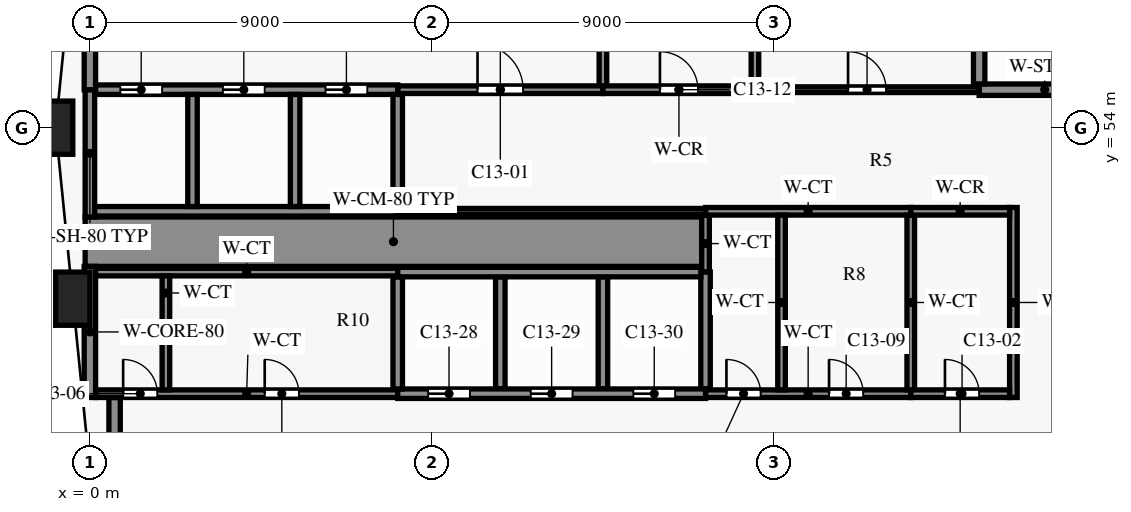
"""IFC4 building model, lengths in metres.
Left out: names, types, materials, properties, quantities, classifications, styles, units other than length and angle.
Written with IfcOpenShell. Run it as: python <this file> out.ifc"""

import sys

from ifc_helpers import new_model, si_unit, direction, frame, frame_2d, origin, origin_2d, place, context, subcontext, project, spatial, rectangle, extrude, element, fill, save


model = new_model("IFC4")
c1 = context("Model", 3, precision=1e-05, world=origin(), true_north=direction((0.0, 1.0)))
c2 = subcontext(c1, "Body", "Model", "MODEL_VIEW")
j1 = project(units=[si_unit("LENGTHUNIT", "METRE"), si_unit("PLANEANGLEUNIT", "RADIAN")], contexts=[c1])
p1 = place(None, origin())
s1 = spatial("IfcSite", under=j1, at=p1, CompositionType="ELEMENT")
p2 = place(p1, origin())
s2 = spatial("IfcBuilding", under=s1, at=p2, CompositionType="ELEMENT")
p3 = place(p2, frame((0.0, 0.0, 84.3)))
s3 = spatial("IfcBuildingStorey", under=s2, at=p3, CompositionType="ELEMENT", Elevation=84.3)
for number, where, z_axis, x_axis in (
    (1, (-0.9, 54.0, 0.0), (0.0, 0.0, 1.0), (0.0, -1.0, 0.0)),
    (2, (-0.45, 49.5, 0.0), (0.0, 0.0, 1.0), (0.1, -0.995, 0.0)),
):
    element("IfcColumn", number, at=place(p3, frame(where, z_axis=z_axis, x_axis=x_axis)), inside=s3, PredefinedType="COLUMN", context=c2, shape_type="SweptSolid", body=[
        extrude(rectangle(XDim=0.9, YDim=1.4, at=origin_2d()), origin(), (0.0, 0.0, 1.0), 4.2),
    ])
p4 = place(p3, frame((0.15, 47.0, 0.0), z_axis=(0.0, 0.0, 1.0), x_axis=(1.0, 0.0, 0.0)))
e3 = element("IfcWall", 3, at=p4, inside=s3, PredefinedType="PARTITIONING", context=c2, shape_type="SweptSolid", body=[
    extrude(rectangle(XDim=7.95, YDim=0.2, at=frame_2d((3.975, 0.0))), origin(), (0.0, 0.0, 1.0), 3.9),
])
p5 = place(p4, frame((0.725, 0.0, 0.0)))
e4 = element("IfcOpeningElement", 4, at=p5, cuts=e3, PredefinedType="OPENING", context=c2, shape_type="SweptSolid", body=[
    extrude(rectangle(XDim=0.9, YDim=2.1, at=frame_2d((0.45, 1.05))), frame((0.0, 0.11, 0.0), z_axis=(0.0, -1.0, 0.0), x_axis=(1.0, 0.0, 0.0)), (0.0, 0.0, 1.0), 0.22),
])
p6 = place(p4, frame((4.45, 0.0, 0.0)))
e5 = element("IfcOpeningElement", 5, at=p6, cuts=e3, PredefinedType="OPENING", context=c2, shape_type="SweptSolid", body=[
    extrude(rectangle(XDim=0.9, YDim=2.1, at=frame_2d((0.45, 1.05))), frame((0.0, 0.11, 0.0), z_axis=(0.0, -1.0, 0.0), x_axis=(1.0, 0.0, 0.0)), (0.0, 0.0, 1.0), 0.22),
])
p7 = place(p3, frame((16.2, 47.0, 0.0), z_axis=(0.0, 0.0, 1.0), x_axis=(1.0, 0.0, 0.0)))
e6 = element("IfcWall", 6, at=p7, inside=s3, PredefinedType="PARTITIONING", context=c2, shape_type="SweptSolid", body=[
    extrude(rectangle(XDim=5.4, YDim=0.2, at=frame_2d((2.7, 0.0))), origin(), (0.0, 0.0, 1.0), 3.9),
])
p8 = place(p7, frame((0.55, 0.0, 0.0)))
e7 = element("IfcOpeningElement", 7, at=p8, cuts=e6, PredefinedType="OPENING", context=c2, shape_type="SweptSolid", body=[
    extrude(rectangle(XDim=0.9, YDim=2.1, at=frame_2d((0.45, 1.05))), frame((0.0, 0.11, 0.0), z_axis=(0.0, -1.0, 0.0), x_axis=(1.0, 0.0, 0.0)), (0.0, 0.0, 1.0), 0.22),
])
p9 = place(p7, frame((3.25, 0.0, 0.0)))
e8 = element("IfcOpeningElement", 8, at=p9, cuts=e6, PredefinedType="OPENING", context=c2, shape_type="SweptSolid", body=[
    extrude(rectangle(XDim=0.9, YDim=2.1, at=frame_2d((0.45, 1.05))), frame((0.0, 0.11, 0.0), z_axis=(0.0, -1.0, 0.0), x_axis=(1.0, 0.0, 0.0)), (0.0, 0.0, 1.0), 0.22),
])
p10 = place(p3, frame((21.6, 47.0, 0.0), z_axis=(0.0, 0.0, 1.0), x_axis=(1.0, 0.0, 0.0)))
e9 = element("IfcWall", 9, at=p10, inside=s3, PredefinedType="PARTITIONING", context=c2, shape_type="SweptSolid", body=[
    extrude(rectangle(XDim=2.6, YDim=0.2, at=frame_2d((1.3, 0.0))), origin(), (0.0, 0.0, 1.0), 3.9),
])
p11 = place(p10, frame((0.9, 0.0, 0.0)))
e10 = element("IfcOpeningElement", 10, at=p11, cuts=e9, PredefinedType="OPENING", context=c2, shape_type="SweptSolid", body=[
    extrude(rectangle(XDim=0.9, YDim=2.1, at=frame_2d((0.45, 1.05))), frame((0.0, 0.11, 0.0), z_axis=(0.0, -1.0, 0.0), x_axis=(1.0, 0.0, 0.0)), (0.0, 0.0, 1.0), 0.22),
])
p12 = place(p3, frame((8.1, 47.0, 0.0), z_axis=(0.0, 0.0, 1.0), x_axis=(1.0, 0.0, 0.0)))
e11 = element("IfcWall", 11, at=p12, inside=s3, PredefinedType="SHEAR", context=c2, shape_type="SweptSolid", body=[
    extrude(rectangle(XDim=8.1, YDim=0.25, at=frame_2d((4.05, 0.0))), origin(), (0.0, 0.0, 1.0), 3.9),
])
p13 = place(p12, frame((0.8, 0.0, 0.0)))
e12 = element("IfcOpeningElement", 12, at=p13, cuts=e11, PredefinedType="OPENING", context=c2, shape_type="SweptSolid", body=[
    extrude(rectangle(XDim=1.1, YDim=2.1, at=frame_2d((0.55, 1.05))), frame((0.0, 0.135, 0.0), z_axis=(0.0, -1.0, 0.0), x_axis=(1.0, 0.0, 0.0)), (0.0, 0.0, 1.0), 0.27),
])
p14 = place(p12, frame((3.5, 0.0, 0.0)))
e13 = element("IfcOpeningElement", 13, at=p14, cuts=e11, PredefinedType="OPENING", context=c2, shape_type="SweptSolid", body=[
    extrude(rectangle(XDim=1.1, YDim=2.1, at=frame_2d((0.55, 1.05))), frame((0.0, 0.135, 0.0), z_axis=(0.0, -1.0, 0.0), x_axis=(1.0, 0.0, 0.0)), (0.0, 0.0, 1.0), 0.27),
])
p15 = place(p12, frame((6.2, 0.0, 0.0)))
e14 = element("IfcOpeningElement", 14, at=p15, cuts=e11, PredefinedType="OPENING", context=c2, shape_type="SweptSolid", body=[
    extrude(rectangle(XDim=1.1, YDim=2.1, at=frame_2d((0.55, 1.05))), frame((0.0, 0.135, 0.0), z_axis=(0.0, -1.0, 0.0), x_axis=(1.0, 0.0, 0.0)), (0.0, 0.0, 1.0), 0.27),
])
p16 = place(p3, frame((0.15, 50.2, 0.0), z_axis=(0.0, 0.0, 1.0), x_axis=(1.0, 0.0, 0.0)))
e15 = element("IfcWall", 15, at=p16, inside=s3, PredefinedType="PARTITIONING", context=c2, shape_type="SweptSolid", body=[
    extrude(rectangle(XDim=7.95, YDim=0.2, at=frame_2d((3.975, 0.0))), origin(), (0.0, 0.0, 1.0), 3.9),
])
p17 = place(p3, frame((8.1, 50.2, 0.0), z_axis=(0.0, 0.0, 1.0), x_axis=(1.0, 0.0, 0.0)))
e16 = element("IfcWall", 16, at=p17, inside=s3, PredefinedType="SHEAR", context=c2, shape_type="SweptSolid", body=[
    extrude(rectangle(XDim=7.975, YDim=0.25, at=frame_2d((3.987, 0.0))), origin(), (0.0, 0.0, 1.0), 3.9),
])
p18 = place(p3, frame((-0.125, 51.0, 0.0), z_axis=(0.0, 0.0, 1.0), x_axis=(1.0, 0.0, 0.0)))
e17 = element("IfcWall", 17, at=p18, inside=s3, PredefinedType="SHEAR", context=c2, shape_type="SweptSolid", body=[
    extrude(rectangle(XDim=16.225, YDim=1.3, at=frame_2d((8.113, 0.0))), origin(), (0.0, 0.0, 1.0), 3.9),
])
p19 = place(p3, frame((8.1, 51.8, 0.0), z_axis=(0.0, 0.0, 1.0), x_axis=(1.0, 0.0, 0.0)))
e18 = element("IfcWall", 18, at=p19, inside=s3, PredefinedType="PARTITIONING", context=c2, shape_type="SweptSolid", body=[
    extrude(rectangle(XDim=8.1, YDim=0.15, at=frame_2d((4.05, 0.0))), origin(), (0.0, 0.0, 1.0), 3.9),
])
p20 = place(p3, frame((16.2, 51.8, 0.0), z_axis=(0.0, 0.0, 1.0), x_axis=(1.0, 0.0, 0.0)))
e19 = element("IfcWall", 19, at=p20, inside=s3, PredefinedType="PARTITIONING", context=c2, shape_type="SweptSolid", body=[
    extrude(rectangle(XDim=5.4, YDim=0.2, at=frame_2d((2.7, 0.0))), origin(), (0.0, 0.0, 1.0), 3.9),
])
p21 = place(p3, frame((21.6, 51.8, 0.0), z_axis=(0.0, 0.0, 1.0), x_axis=(1.0, 0.0, 0.0)))
e20 = element("IfcWall", 20, at=p21, inside=s3, PredefinedType="PARTITIONING", context=c2, shape_type="SweptSolid", body=[
    extrude(rectangle(XDim=2.6, YDim=0.2, at=frame_2d((1.3, 0.0))), origin(), (0.0, 0.0, 1.0), 3.9),
])
p22 = place(p3, frame((0.125, 51.8, 0.0), z_axis=(0.0, 0.0, 1.0), x_axis=(1.0, 0.0, 0.0)))
e21 = element("IfcWall", 21, at=p22, inside=s3, PredefinedType="SHEAR", context=c2, shape_type="SweptSolid", body=[
    extrude(rectangle(XDim=7.975, YDim=0.25, at=frame_2d((3.988, 0.0))), origin(), (0.0, 0.0, 1.0), 3.9),
])
p23 = place(p3, frame((8.1, 55.0, 0.0), z_axis=(0.0, 0.0, 1.0), x_axis=(1.0, 0.0, 0.0)))
e22 = element("IfcWall", 22, at=p23, inside=s3, PredefinedType="PARTITIONING", context=c2, shape_type="SweptSolid", body=[
    extrude(rectangle(XDim=5.4, YDim=0.2, at=frame_2d((2.7, 0.0))), origin(), (0.0, 0.0, 1.0), 3.9),
])
p24 = place(p23, frame((2.1, 0.0, 0.0)))
e23 = element("IfcOpeningElement", 23, at=p24, cuts=e22, PredefinedType="OPENING", context=c2, shape_type="SweptSolid", body=[
    extrude(rectangle(XDim=1.2, YDim=2.2, at=frame_2d((0.6, 1.1))), frame((0.0, 0.11, 0.0), z_axis=(0.0, -1.0, 0.0), x_axis=(1.0, 0.0, 0.0)), (0.0, 0.0, 1.0), 0.22),
])
p25 = place(p3, frame((17.5, 55.0, 0.0), z_axis=(0.0, 0.0, 1.0), x_axis=(1.0, 0.0, 0.0)))
e24 = element("IfcWall", 24, at=p25, inside=s3, PredefinedType="PARTITIONING", context=c2, shape_type="SweptSolid", body=[
    extrude(rectangle(XDim=5.9, YDim=0.15, at=frame_2d((2.95, 0.0))), origin(), (0.0, 0.0, 1.0), 3.9),
])
p26 = place(p25, frame((2.45, 0.0, 0.0)))
e25 = element("IfcOpeningElement", 25, at=p26, cuts=e24, PredefinedType="OPENING", context=c2, shape_type="SweptSolid", body=[
    extrude(rectangle(XDim=1.0, YDim=2.1, at=frame_2d((0.5, 1.05))), frame((0.0, 0.085, 0.0), z_axis=(0.0, -1.0, 0.0), x_axis=(1.0, 0.0, 0.0)), (0.0, 0.0, 1.0), 0.17),
])
p27 = place(p3, frame((13.5, 55.0, 0.0), z_axis=(0.0, 0.0, 1.0), x_axis=(1.0, 0.0, 0.0)))
e26 = element("IfcWall", 26, at=p27, inside=s3, PredefinedType="PARTITIONING", context=c2, shape_type="SweptSolid", body=[
    extrude(rectangle(XDim=4.0, YDim=0.2, at=frame_2d((2.0, 0.0))), origin(), (0.0, 0.0, 1.0), 3.9),
])
p28 = place(p27, frame((1.5, 0.0, 0.0)))
e27 = element("IfcOpeningElement", 27, at=p28, cuts=e26, PredefinedType="OPENING", context=c2, shape_type="SweptSolid", body=[
    extrude(rectangle(XDim=1.0, YDim=2.1, at=frame_2d((0.5, 1.05))), frame((0.0, 0.11, 0.0), z_axis=(0.0, -1.0, 0.0), x_axis=(1.0, 0.0, 0.0)), (0.0, 0.0, 1.0), 0.22),
])
p29 = place(p3, frame((0.15, 55.0, 0.0), z_axis=(0.0, 0.0, 1.0), x_axis=(1.0, 0.0, 0.0)))
e28 = element("IfcWall", 28, at=p29, inside=s3, PredefinedType="SHEAR", context=c2, shape_type="SweptSolid", body=[
    extrude(rectangle(XDim=7.95, YDim=0.25, at=frame_2d((3.975, 0.0))), origin(), (0.0, 0.0, 1.0), 3.9),
])
p30 = place(p29, frame((0.65, 0.0, 0.0)))
e29 = element("IfcOpeningElement", 29, at=p30, cuts=e28, PredefinedType="OPENING", context=c2, shape_type="SweptSolid", body=[
    extrude(rectangle(XDim=1.1, YDim=2.1, at=frame_2d((0.55, 1.05))), frame((0.0, 0.135, 0.0), z_axis=(0.0, -1.0, 0.0), x_axis=(1.0, 0.0, 0.0)), (0.0, 0.0, 1.0), 0.27),
])
p31 = place(p29, frame((3.35, 0.0, 0.0)))
e30 = element("IfcOpeningElement", 30, at=p31, cuts=e28, PredefinedType="OPENING", context=c2, shape_type="SweptSolid", body=[
    extrude(rectangle(XDim=1.1, YDim=2.1, at=frame_2d((0.55, 1.05))), frame((0.0, 0.135, 0.0), z_axis=(0.0, -1.0, 0.0), x_axis=(1.0, 0.0, 0.0)), (0.0, 0.0, 1.0), 0.27),
])
p32 = place(p29, frame((6.05, 0.0, 0.0)))
e31 = element("IfcOpeningElement", 31, at=p32, cuts=e28, PredefinedType="OPENING", context=c2, shape_type="SweptSolid", body=[
    extrude(rectangle(XDim=1.1, YDim=2.1, at=frame_2d((0.55, 1.05))), frame((0.0, 0.135, 0.0), z_axis=(0.0, -1.0, 0.0), x_axis=(1.0, 0.0, 0.0)), (0.0, 0.0, 1.0), 0.27),
])
for number, where, z_axis, x_axis in (
    (32, (23.4, 55.0, 0.0), (0.0, 0.0, 1.0), (1.0, 0.0, 0.0)),
    (33, (0.0, 46.9, 0.0), (0.0, 0.0, 1.0), (0.0, 1.0, 0.0)),
):
    element("IfcWall", number, at=place(p3, frame(where, z_axis=z_axis, x_axis=x_axis)), inside=s3, PredefinedType="SHEAR", context=c2, shape_type="SweptSolid", body=[
        extrude(rectangle(XDim=3.45, YDim=0.3, at=frame_2d((1.725, 0.0))), origin(), (0.0, 0.0, 1.0), 3.9),
    ])
p33 = place(p3, frame((0.0, 55.0, 0.0), z_axis=(0.0, 0.0, 1.0), x_axis=(0.0, 1.0, 0.0)))
e34 = element("IfcWall", 34, at=p33, inside=s3, PredefinedType="SHEAR", context=c2, shape_type="SweptSolid", body=[
    extrude(rectangle(XDim=3.0, YDim=0.3, at=frame_2d((1.5, 0.0))), origin(), (0.0, 0.0, 1.0), 3.9),
])
p34 = place(p3, frame((0.0, 51.65, 0.0), z_axis=(0.0, 0.0, 1.0), x_axis=(0.0, 1.0, 0.0)))
e35 = element("IfcWall", 35, at=p34, inside=s3, PredefinedType="SHEAR", context=c2, shape_type="SweptSolid", body=[
    extrude(rectangle(XDim=3.35, YDim=0.25, at=frame_2d((1.675, 0.0))), origin(), (0.0, 0.0, 1.0), 3.9),
])
p35 = place(p3, frame((0.65, 43.3, 0.0), z_axis=(0.0, 0.0, 1.0), x_axis=(0.0, 1.0, 0.0)))
e36 = element("IfcWall", 36, at=p35, inside=s3, PredefinedType="SHEAR", context=c2, shape_type="SweptSolid", body=[
    extrude(rectangle(XDim=3.6, YDim=0.3, at=frame_2d((1.8, 0.0))), origin(), (0.0, 0.0, 1.0), 3.9),
])
p36 = place(p3, frame((2.0, 47.1, 0.0), z_axis=(0.0, 0.0, 1.0), x_axis=(0.0, 1.0, 0.0)))
e37 = element("IfcWall", 37, at=p36, inside=s3, PredefinedType="PARTITIONING", context=c2, shape_type="SweptSolid", body=[
    extrude(rectangle(XDim=3.0, YDim=0.2, at=frame_2d((1.5, 0.0))), origin(), (0.0, 0.0, 1.0), 3.9),
])
for number, where, z_axis, x_axis in (
    (38, (2.7, 51.925, 0.0), (0.0, 0.0, 1.0), (0.0, 1.0, 0.0)),
    (39, (5.4, 51.925, 0.0), (0.0, 0.0, 1.0), (0.0, 1.0, 0.0)),
    (40, (8.1, 47.125, 0.0), (0.0, 0.0, 1.0), (0.0, 1.0, 0.0)),
    (41, (8.1, 51.925, 0.0), (0.0, 0.0, 1.0), (0.0, 1.0, 0.0)),
    (42, (10.8, 47.125, 0.0), (0.0, 0.0, 1.0), (0.0, 1.0, 0.0)),
):
    element("IfcWall", number, at=place(p3, frame(where, z_axis=z_axis, x_axis=x_axis)), inside=s3, PredefinedType="SHEAR", context=c2, shape_type="SweptSolid", body=[
        extrude(rectangle(XDim=2.95, YDim=0.25, at=frame_2d((1.475, 0.0))), origin(), (0.0, 0.0, 1.0), 3.9),
    ])
p37 = place(p3, frame((13.5, 55.1, 0.0), z_axis=(0.0, 0.0, 1.0), x_axis=(0.0, 1.0, 0.0)))
e43 = element("IfcWall", 43, at=p37, inside=s3, PredefinedType="PARTITIONING", context=c2, shape_type="SweptSolid", body=[
    extrude(rectangle(XDim=3.9, YDim=0.2, at=frame_2d((1.95, 0.0))), origin(), (0.0, 0.0, 1.0), 3.9),
])
p38 = place(p3, frame((13.5, 47.125, 0.0), z_axis=(0.0, 0.0, 1.0), x_axis=(0.0, 1.0, 0.0)))
e44 = element("IfcWall", 44, at=p38, inside=s3, PredefinedType="SHEAR", context=c2, shape_type="SweptSolid", body=[
    extrude(rectangle(XDim=2.95, YDim=0.25, at=frame_2d((1.475, 0.0))), origin(), (0.0, 0.0, 1.0), 3.9),
])
p39 = place(p3, frame((16.2, 50.2, 0.0), z_axis=(0.0, 0.0, 1.0), x_axis=(0.0, 1.0, 0.0)))
e45 = element("IfcWall", 45, at=p39, inside=s3, PredefinedType="PARTITIONING", context=c2, shape_type="SweptSolid", body=[
    extrude(rectangle(XDim=1.5, YDim=0.2, at=frame_2d((0.75, 0.0))), origin(), (0.0, 0.0, 1.0), 3.9),
])
p40 = place(p3, frame((16.2, 47.125, 0.0), z_axis=(0.0, 0.0, 1.0), x_axis=(0.0, 1.0, 0.0)))
e46 = element("IfcWall", 46, at=p40, inside=s3, PredefinedType="SHEAR", context=c2, shape_type="SweptSolid", body=[
    extrude(rectangle(XDim=3.075, YDim=0.25, at=frame_2d((1.538, 0.0))), origin(), (0.0, 0.0, 1.0), 3.9),
])
p41 = place(p3, frame((17.5, 55.1, 0.0), z_axis=(0.0, 0.0, 1.0), x_axis=(0.0, 1.0, 0.0)))
e47 = element("IfcWall", 47, at=p41, inside=s3, PredefinedType="PARTITIONING", context=c2, shape_type="SweptSolid", body=[
    extrude(rectangle(XDim=7.05, YDim=0.2, at=frame_2d((3.525, 0.0))), origin(), (0.0, 0.0, 1.0), 3.9),
])
for number, where, z_axis, x_axis in (
    (48, (18.2, 47.1, 0.0), (0.0, 0.0, 1.0), (0.0, 1.0, 0.0)),
    (49, (21.6, 47.1, 0.0), (0.0, 0.0, 1.0), (0.0, 1.0, 0.0)),
):
    element("IfcWall", number, at=place(p3, frame(where, z_axis=z_axis, x_axis=x_axis)), inside=s3, PredefinedType="PARTITIONING", context=c2, shape_type="SweptSolid", body=[
        extrude(rectangle(XDim=4.6, YDim=0.2, at=frame_2d((2.3, 0.0))), origin(), (0.0, 0.0, 1.0), 3.9),
    ])
p42 = place(p3, frame((23.4, 55.15, 0.0), z_axis=(0.0, 0.0, 1.0), x_axis=(0.0, 1.0, 0.0)))
e50 = element("IfcWall", 50, at=p42, inside=s3, PredefinedType="SHEAR", context=c2, shape_type="SweptSolid", body=[
    extrude(rectangle(XDim=8.0, YDim=0.3, at=frame_2d((4.0, 0.0))), origin(), (0.0, 0.0, 1.0), 3.9),
])
p43 = place(p3, frame((24.3, 46.9, 0.0), z_axis=(0.0, 0.0, 1.0), x_axis=(0.0, 1.0, 0.0)))
e51 = element("IfcWall", 51, at=p43, inside=s3, PredefinedType="SHEAR", context=c2, shape_type="SweptSolid", body=[
    extrude(rectangle(XDim=5.0, YDim=0.2, at=frame_2d((2.5, 0.0))), origin(), (0.0, 0.0, 1.0), 3.9),
])
p44 = place(p24, origin())
e52 = element("IfcDoor", 52, at=p44, inside=s3, OperationType="SINGLE_SWING_RIGHT", PredefinedType="DOOR", context=c2, shape_type="SweptSolid", body=[
    extrude(rectangle(XDim=1.2, YDim=2.2, at=frame_2d((0.6, 1.1))), frame((0.0, 0.025, 0.0), z_axis=(0.0, -1.0, 0.0), x_axis=(1.0, 0.0, 0.0)), (0.0, 0.0, 1.0), 0.05),
])
fill(e23, e52)
p45 = place(p11, origin())
e53 = element("IfcDoor", 53, at=p45, inside=s3, OperationType="SINGLE_SWING_LEFT", PredefinedType="DOOR", context=c2, shape_type="SweptSolid", body=[
    extrude(rectangle(XDim=0.9, YDim=2.1, at=frame_2d((0.45, 1.05))), frame((0.0, 0.025, 0.0), z_axis=(0.0, -1.0, 0.0), x_axis=(1.0, 0.0, 0.0)), (0.0, 0.0, 1.0), 0.05),
])
fill(e10, e53)
p46 = place(p5, origin())
e54 = element("IfcDoor", 54, at=p46, inside=s3, OperationType="SINGLE_SWING_RIGHT", PredefinedType="DOOR", context=c2, shape_type="SweptSolid", body=[
    extrude(rectangle(XDim=0.9, YDim=2.1, at=frame_2d((0.45, 1.05))), frame((0.0, 0.025, 0.0), z_axis=(0.0, -1.0, 0.0), x_axis=(1.0, 0.0, 0.0)), (0.0, 0.0, 1.0), 0.05),
])
fill(e4, e54)
p47 = place(p6, origin())
e55 = element("IfcDoor", 55, at=p47, inside=s3, OperationType="SINGLE_SWING_LEFT", PredefinedType="DOOR", context=c2, shape_type="SweptSolid", body=[
    extrude(rectangle(XDim=0.9, YDim=2.1, at=frame_2d((0.45, 1.05))), frame((0.0, 0.025, 0.0), z_axis=(0.0, -1.0, 0.0), x_axis=(1.0, 0.0, 0.0)), (0.0, 0.0, 1.0), 0.05),
])
fill(e5, e55)
p48 = place(p8, origin())
e56 = element("IfcDoor", 56, at=p48, inside=s3, OperationType="SINGLE_SWING_LEFT", PredefinedType="DOOR", context=c2, shape_type="SweptSolid", body=[
    extrude(rectangle(XDim=0.9, YDim=2.1, at=frame_2d((0.45, 1.05))), frame((0.0, 0.025, 0.0), z_axis=(0.0, -1.0, 0.0), x_axis=(1.0, 0.0, 0.0)), (0.0, 0.0, 1.0), 0.05),
])
fill(e7, e56)
p49 = place(p9, origin())
e57 = element("IfcDoor", 57, at=p49, inside=s3, OperationType="SINGLE_SWING_RIGHT", PredefinedType="DOOR", context=c2, shape_type="SweptSolid", body=[
    extrude(rectangle(XDim=0.9, YDim=2.1, at=frame_2d((0.45, 1.05))), frame((0.0, 0.025, 0.0), z_axis=(0.0, -1.0, 0.0), x_axis=(1.0, 0.0, 0.0)), (0.0, 0.0, 1.0), 0.05),
])
fill(e8, e57)
p50 = place(p28, origin())
e58 = element("IfcDoor", 58, at=p50, inside=s3, OperationType="SINGLE_SWING_LEFT", PredefinedType="DOOR", context=c2, shape_type="SweptSolid", body=[
    extrude(rectangle(XDim=1.0, YDim=2.1, at=frame_2d((0.5, 1.05))), frame((0.0, 0.025, 0.0), z_axis=(0.0, -1.0, 0.0), x_axis=(1.0, 0.0, 0.0)), (0.0, 0.0, 1.0), 0.05),
])
fill(e27, e58)
p51 = place(p26, origin())
e59 = element("IfcDoor", 59, at=p51, inside=s3, OperationType="SINGLE_SWING_RIGHT", PredefinedType="DOOR", context=c2, shape_type="SweptSolid", body=[
    extrude(rectangle(XDim=1.0, YDim=2.1, at=frame_2d((0.5, 1.05))), frame((0.0, 0.025, 0.0), z_axis=(0.0, -1.0, 0.0), x_axis=(1.0, 0.0, 0.0)), (0.0, 0.0, 1.0), 0.05),
])
fill(e25, e59)
p52 = place(p30, origin())
e60 = element("IfcDoor", 60, at=p52, inside=s3, OperationType="DOUBLE_DOOR_SLIDING", PredefinedType="DOOR", context=c2, shape_type="SweptSolid", body=[
    extrude(rectangle(XDim=1.1, YDim=2.1, at=frame_2d((0.55, 1.05))), frame((0.0, 0.025, 0.0), z_axis=(0.0, -1.0, 0.0), x_axis=(1.0, 0.0, 0.0)), (0.0, 0.0, 1.0), 0.05),
])
fill(e29, e60)
p53 = place(p31, origin())
e61 = element("IfcDoor", 61, at=p53, inside=s3, OperationType="DOUBLE_DOOR_SLIDING", PredefinedType="DOOR", context=c2, shape_type="SweptSolid", body=[
    extrude(rectangle(XDim=1.1, YDim=2.1, at=frame_2d((0.55, 1.05))), frame((0.0, 0.025, 0.0), z_axis=(0.0, -1.0, 0.0), x_axis=(1.0, 0.0, 0.0)), (0.0, 0.0, 1.0), 0.05),
])
fill(e30, e61)
p54 = place(p32, origin())
e62 = element("IfcDoor", 62, at=p54, inside=s3, OperationType="DOUBLE_DOOR_SLIDING", PredefinedType="DOOR", context=c2, shape_type="SweptSolid", body=[
    extrude(rectangle(XDim=1.1, YDim=2.1, at=frame_2d((0.55, 1.05))), frame((0.0, 0.025, 0.0), z_axis=(0.0, -1.0, 0.0), x_axis=(1.0, 0.0, 0.0)), (0.0, 0.0, 1.0), 0.05),
])
fill(e31, e62)
p55 = place(p13, origin())
e63 = element("IfcDoor", 63, at=p55, inside=s3, OperationType="DOUBLE_DOOR_SLIDING", PredefinedType="DOOR", context=c2, shape_type="SweptSolid", body=[
    extrude(rectangle(XDim=1.1, YDim=2.1, at=frame_2d((0.55, 1.05))), frame((0.0, 0.025, 0.0), z_axis=(0.0, -1.0, 0.0), x_axis=(1.0, 0.0, 0.0)), (0.0, 0.0, 1.0), 0.05),
])
fill(e12, e63)
p56 = place(p14, origin())
e64 = element("IfcDoor", 64, at=p56, inside=s3, OperationType="DOUBLE_DOOR_SLIDING", PredefinedType="DOOR", context=c2, shape_type="SweptSolid", body=[
    extrude(rectangle(XDim=1.1, YDim=2.1, at=frame_2d((0.55, 1.05))), frame((0.0, 0.025, 0.0), z_axis=(0.0, -1.0, 0.0), x_axis=(1.0, 0.0, 0.0)), (0.0, 0.0, 1.0), 0.05),
])
fill(e13, e64)
p57 = place(p15, origin())
e65 = element("IfcDoor", 65, at=p57, inside=s3, OperationType="DOUBLE_DOOR_SLIDING", PredefinedType="DOOR", context=c2, shape_type="SweptSolid", body=[
    extrude(rectangle(XDim=1.1, YDim=2.1, at=frame_2d((0.55, 1.05))), frame((0.0, 0.025, 0.0), z_axis=(0.0, -1.0, 0.0), x_axis=(1.0, 0.0, 0.0)), (0.0, 0.0, 1.0), 0.05),
])
fill(e14, e65)
save(model, sys.argv[1])
